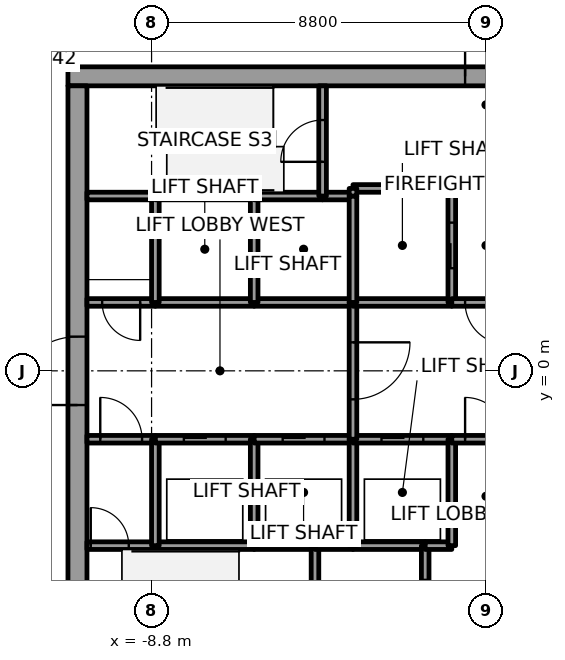
"""IFC4 building model, lengths in metres.
Left out: names, types, materials, properties, quantities, classifications, styles, units other than length and angle.
Written with IfcOpenShell. Run it as: python <this file> out.ifc"""

import sys

from ifc_helpers import new_model, si_unit, direction, frame, frame_2d, origin, place, context, subcontext, project, spatial, rectangle, extrude, element, fill, save


model = new_model("IFC4")
c1 = context("Model", 3, precision=1e-05, world=origin(), true_north=direction((0.0, 1.0)))
c2 = subcontext(c1, "Body", "Model", "MODEL_VIEW")
j1 = project(units=[si_unit("LENGTHUNIT", "METRE"), si_unit("PLANEANGLEUNIT", "RADIAN")], contexts=[c1])
p1 = place(None, origin())
s1 = spatial("IfcSite", under=j1, at=p1, CompositionType="ELEMENT")
p2 = place(p1, origin())
s2 = spatial("IfcBuilding", under=s1, at=p2, CompositionType="ELEMENT")
p3 = place(p2, frame((0.0, 0.0, 103.5)))
s3 = spatial("IfcBuildingStorey", under=s2, at=p3, CompositionType="ELEMENT", Elevation=103.5)
p4 = place(p3, frame((-11.0, 7.75, 0.0), z_axis=(0.0, 0.0, 1.0), x_axis=(1.0, 0.0, 0.0)))
e1 = element("IfcWall", 1, at=p4, inside=s3, PredefinedType="SHEAR", context=c2, shape_type="SweptSolid", body=[
    extrude(rectangle(XDim=22.0, YDim=0.5, at=frame_2d((11.0, 0.0))), origin(), (0.0, 0.0, 1.0), 3.7),
])
p5 = place(p4, frame((10.45, 0.0, 0.0)))
e2 = element("IfcOpeningElement", 2, at=p5, cuts=e1, PredefinedType="OPENING", context=c2, shape_type="SweptSolid", body=[
    extrude(rectangle(XDim=1.1, YDim=2.1, at=frame_2d((0.55, 1.05))), frame((0.0, 0.25, 0.0), z_axis=(0.0, -1.0, 0.0), x_axis=(1.0, 0.0, 0.0)), (0.0, 0.0, 1.0), 0.5),
])
p6 = place(p3, frame((-10.75, -7.5, 0.0), z_axis=(0.0, 0.0, 1.0), x_axis=(0.0, 1.0, 0.0)))
e3 = element("IfcWall", 3, at=p6, inside=s3, PredefinedType="SHEAR", context=c2, shape_type="SweptSolid", body=[
    extrude(rectangle(XDim=15.0, YDim=0.5, at=frame_2d((7.5, 0.0))), origin(), (0.0, 0.0, 1.0), 3.7),
])
p7 = place(p6, frame((6.6, 0.0, 0.0)))
e4 = element("IfcOpeningElement", 4, at=p7, cuts=e3, PredefinedType="OPENING", context=c2, shape_type="SweptSolid", body=[
    extrude(rectangle(XDim=1.8, YDim=2.1, at=frame_2d((0.9, 1.05))), frame((0.0, 0.25, 0.0), z_axis=(0.0, -1.0, 0.0), x_axis=(1.0, 0.0, 0.0)), (0.0, 0.0, 1.0), 0.5),
])
p8 = place(p3, frame((-10.5, -4.6, 0.0), z_axis=(0.0, 0.0, 1.0), x_axis=(1.0, 0.0, 0.0)))
e5 = element("IfcWall", 5, at=p8, inside=s3, PredefinedType="SOLIDWALL", context=c2, shape_type="SweptSolid", body=[
    extrude(rectangle(XDim=1.8, YDim=0.2, at=frame_2d((0.9, 0.0))), origin(), (0.0, 0.0, 1.0), 3.55),
])
p9 = place(p8, frame((0.1, 0.0, 0.0)))
e6 = element("IfcOpeningElement", 6, at=p9, cuts=e5, PredefinedType="OPENING", context=c2, shape_type="SweptSolid", body=[
    extrude(rectangle(XDim=1.0, YDim=2.1, at=frame_2d((0.5, 1.05))), frame((0.0, 0.1, 0.0), z_axis=(0.0, -1.0, 0.0), x_axis=(1.0, 0.0, 0.0)), (0.0, 0.0, 1.0), 0.2),
])
p10 = place(p3, frame((-10.5, -1.8, 0.0), z_axis=(0.0, 0.0, 1.0), x_axis=(1.0, 0.0, 0.0)))
e7 = element("IfcWall", 7, at=p10, inside=s3, PredefinedType="SOLIDWALL", context=c2, shape_type="SweptSolid", body=[
    extrude(rectangle(XDim=1.8, YDim=0.2, at=frame_2d((0.9, 0.0))), origin(), (0.0, 0.0, 1.0), 3.55),
])
p11 = place(p10, frame((0.35, 0.0, 0.0)))
e8 = element("IfcOpeningElement", 8, at=p11, cuts=e7, PredefinedType="OPENING", context=c2, shape_type="SweptSolid", body=[
    extrude(rectangle(XDim=1.1, YDim=2.1, at=frame_2d((0.55, 1.05))), frame((0.0, 0.1, 0.0), z_axis=(0.0, -1.0, 0.0), x_axis=(1.0, 0.0, 0.0)), (0.0, 0.0, 1.0), 0.2),
])
p12 = place(p3, frame((-8.7, 1.8, 0.0), z_axis=(0.0, 0.0, 1.0), x_axis=(-1.0, 0.0, 0.0)))
e9 = element("IfcWall", 9, at=p12, inside=s3, PredefinedType="SOLIDWALL", context=c2, shape_type="SweptSolid", body=[
    extrude(rectangle(XDim=1.8, YDim=0.2, at=frame_2d((0.9, 0.0))), origin(), (0.0, 0.0, 1.0), 3.55),
])
p13 = place(p12, frame((0.4, 0.0, 0.0)))
e10 = element("IfcOpeningElement", 10, at=p13, cuts=e9, PredefinedType="OPENING", context=c2, shape_type="SweptSolid", body=[
    extrude(rectangle(XDim=1.0, YDim=2.1, at=frame_2d((0.5, 1.05))), frame((0.0, 0.1, 0.0), z_axis=(0.0, -1.0, 0.0), x_axis=(1.0, 0.0, 0.0)), (0.0, 0.0, 1.0), 0.2),
])
p14 = place(p3, frame((-8.7, 4.6, 0.0), z_axis=(0.0, 0.0, 1.0), x_axis=(-1.0, 0.0, 0.0)))
e11 = element("IfcWall", 11, at=p14, inside=s3, PredefinedType="SOLIDWALL", context=c2, shape_type="SweptSolid", body=[
    extrude(rectangle(XDim=1.8, YDim=0.2, at=frame_2d((0.9, 0.0))), origin(), (0.0, 0.0, 1.0), 3.55),
])
p15 = place(p3, frame((-8.7, -4.6, 0.0), z_axis=(0.0, 0.0, 1.0), x_axis=(1.0, 0.0, 0.0)))
e12 = element("IfcWall", 12, at=p15, inside=s3, PredefinedType="SOLIDWALL", context=c2, shape_type="SweptSolid", body=[
    extrude(rectangle(XDim=2.6, YDim=0.2, at=frame_2d((1.3, 0.0))), origin(), (0.0, 0.0, 1.0), 3.55),
])
p16 = place(p3, frame((-8.7, -4.6, 0.0), z_axis=(0.0, 0.0, 1.0), x_axis=(0.0, 1.0, 0.0)))
e13 = element("IfcWall", 13, at=p16, inside=s3, PredefinedType="SOLIDWALL", context=c2, shape_type="SweptSolid", body=[
    extrude(rectangle(XDim=2.8, YDim=0.2, at=frame_2d((1.4, 0.0))), origin(), (0.0, 0.0, 1.0), 3.55),
])
p17 = place(p3, frame((-8.7, -1.8, 0.0), z_axis=(0.0, 0.0, 1.0), x_axis=(1.0, 0.0, 0.0)))
e14 = element("IfcWall", 14, at=p17, inside=s3, PredefinedType="SOLIDWALL", context=c2, shape_type="SweptSolid", body=[
    extrude(rectangle(XDim=2.6, YDim=0.2, at=frame_2d((1.3, 0.0))), origin(), (0.0, 0.0, 1.0), 3.55),
])
p18 = place(p17, frame((0.75, 0.0, 0.0)))
e15 = element("IfcOpeningElement", 15, at=p18, cuts=e14, PredefinedType="OPENING", context=c2, shape_type="SweptSolid", body=[
    extrude(rectangle(XDim=1.1, YDim=2.1, at=frame_2d((0.55, 1.05))), frame((0.0, 0.1, 0.0), z_axis=(0.0, -1.0, 0.0), x_axis=(1.0, 0.0, 0.0)), (0.0, 0.0, 1.0), 0.2),
])
p19 = place(p3, frame((-6.1, 1.8, 0.0), z_axis=(0.0, 0.0, 1.0), x_axis=(-1.0, 0.0, 0.0)))
e16 = element("IfcWall", 16, at=p19, inside=s3, PredefinedType="SOLIDWALL", context=c2, shape_type="SweptSolid", body=[
    extrude(rectangle(XDim=2.6, YDim=0.2, at=frame_2d((1.3, 0.0))), origin(), (0.0, 0.0, 1.0), 3.55),
])
p20 = place(p3, frame((-8.7, 1.8, 0.0), z_axis=(0.0, 0.0, 1.0), x_axis=(0.0, 1.0, 0.0)))
e17 = element("IfcWall", 17, at=p20, inside=s3, PredefinedType="SOLIDWALL", context=c2, shape_type="SweptSolid", body=[
    extrude(rectangle(XDim=2.8, YDim=0.2, at=frame_2d((1.4, 0.0))), origin(), (0.0, 0.0, 1.0), 3.55),
])
p21 = place(p3, frame((-6.1, 4.6, 0.0), z_axis=(0.0, 0.0, 1.0), x_axis=(-1.0, 0.0, 0.0)))
e18 = element("IfcWall", 18, at=p21, inside=s3, PredefinedType="SOLIDWALL", context=c2, shape_type="SweptSolid", body=[
    extrude(rectangle(XDim=2.6, YDim=0.2, at=frame_2d((1.3, 0.0))), origin(), (0.0, 0.0, 1.0), 3.55),
])
p22 = place(p3, frame((-6.1, -4.6, 0.0), z_axis=(0.0, 0.0, 1.0), x_axis=(1.0, 0.0, 0.0)))
e19 = element("IfcWall", 19, at=p22, inside=s3, PredefinedType="SOLIDWALL", context=c2, shape_type="SweptSolid", body=[
    extrude(rectangle(XDim=1.6, YDim=0.2, at=frame_2d((0.8, 0.0))), origin(), (0.0, 0.0, 1.0), 3.55),
])
p23 = place(p3, frame((-6.1, -4.6, 0.0), z_axis=(0.0, 0.0, 1.0), x_axis=(0.0, 1.0, 0.0)))
e20 = element("IfcWall", 20, at=p23, inside=s3, PredefinedType="SOLIDWALL", context=c2, shape_type="SweptSolid", body=[
    extrude(rectangle(XDim=2.8, YDim=0.2, at=frame_2d((1.4, 0.0))), origin(), (0.0, 0.0, 1.0), 3.55),
])
p24 = place(p3, frame((-6.1, -1.8, 0.0), z_axis=(0.0, 0.0, 1.0), x_axis=(1.0, 0.0, 0.0)))
e21 = element("IfcWall", 21, at=p24, inside=s3, PredefinedType="SOLIDWALL", context=c2, shape_type="SweptSolid", body=[
    extrude(rectangle(XDim=2.6, YDim=0.2, at=frame_2d((1.3, 0.0))), origin(), (0.0, 0.0, 1.0), 3.55),
])
p25 = place(p24, frame((0.75, 0.0, 0.0)))
e22 = element("IfcOpeningElement", 22, at=p25, cuts=e21, PredefinedType="OPENING", context=c2, shape_type="SweptSolid", body=[
    extrude(rectangle(XDim=1.1, YDim=2.1, at=frame_2d((0.55, 1.05))), frame((0.0, 0.1, 0.0), z_axis=(0.0, -1.0, 0.0), x_axis=(1.0, 0.0, 0.0)), (0.0, 0.0, 1.0), 0.2),
])
p26 = place(p3, frame((-3.5, 1.8, 0.0), z_axis=(0.0, 0.0, 1.0), x_axis=(-1.0, 0.0, 0.0)))
e23 = element("IfcWall", 23, at=p26, inside=s3, PredefinedType="SOLIDWALL", context=c2, shape_type="SweptSolid", body=[
    extrude(rectangle(XDim=2.6, YDim=0.2, at=frame_2d((1.3, 0.0))), origin(), (0.0, 0.0, 1.0), 3.55),
])
p27 = place(p3, frame((-6.1, 1.8, 0.0), z_axis=(0.0, 0.0, 1.0), x_axis=(0.0, 1.0, 0.0)))
e24 = element("IfcWall", 24, at=p27, inside=s3, PredefinedType="SOLIDWALL", context=c2, shape_type="SweptSolid", body=[
    extrude(rectangle(XDim=2.8, YDim=0.2, at=frame_2d((1.4, 0.0))), origin(), (0.0, 0.0, 1.0), 3.55),
])
p28 = place(p3, frame((-4.3, 4.6, 0.0), z_axis=(0.0, 0.0, 1.0), x_axis=(-1.0, 0.0, 0.0)))
e25 = element("IfcWall", 25, at=p28, inside=s3, PredefinedType="SOLIDWALL", context=c2, shape_type="SweptSolid", body=[
    extrude(rectangle(XDim=1.8, YDim=0.2, at=frame_2d((0.9, 0.0))), origin(), (0.0, 0.0, 1.0), 3.55),
])
p29 = place(p3, frame((-4.5, -4.6, 0.0), z_axis=(0.0, 0.0, 1.0), x_axis=(0.0, -1.0, 0.0)))
e26 = element("IfcWall", 26, at=p29, inside=s3, PredefinedType="SOLIDWALL", context=c2, shape_type="SweptSolid", body=[
    extrude(rectangle(XDim=2.9, YDim=0.2, at=frame_2d((1.45, 0.0))), origin(), (0.0, 0.0, 1.0), 3.55),
])
p30 = place(p3, frame((-4.5, -4.6, 0.0), z_axis=(0.0, 0.0, 1.0), x_axis=(1.0, 0.0, 0.0)))
e27 = element("IfcWall", 27, at=p30, inside=s3, PredefinedType="SOLIDWALL", context=c2, shape_type="SweptSolid", body=[
    extrude(rectangle(XDim=1.0, YDim=0.2, at=frame_2d((0.5, 0.0))), origin(), (0.0, 0.0, 1.0), 3.55),
])
p31 = place(p3, frame((-3.5, 4.6, 0.0), z_axis=(0.0, 0.0, 1.0), x_axis=(-1.0, 0.0, 0.0)))
e28 = element("IfcWall", 28, at=p31, inside=s3, PredefinedType="SOLIDWALL", context=c2, shape_type="SweptSolid", body=[
    extrude(rectangle(XDim=0.8, YDim=0.2, at=frame_2d((0.4, 0.0))), origin(), (0.0, 0.0, 1.0), 3.55),
])
p32 = place(p3, frame((-4.3, 4.6, 0.0), z_axis=(0.0, 0.0, 1.0), x_axis=(0.0, 1.0, 0.0)))
e29 = element("IfcWall", 29, at=p32, inside=s3, PredefinedType="SOLIDWALL", context=c2, shape_type="SweptSolid", body=[
    extrude(rectangle(XDim=2.9, YDim=0.2, at=frame_2d((1.45, 0.0))), origin(), (0.0, 0.0, 1.0), 3.55),
])
p33 = place(p32, frame((0.9, 0.0, 0.0)))
e30 = element("IfcOpeningElement", 30, at=p33, cuts=e29, PredefinedType="OPENING", context=c2, shape_type="SweptSolid", body=[
    extrude(rectangle(XDim=1.1, YDim=2.1, at=frame_2d((0.55, 1.05))), frame((0.0, 0.1, 0.0), z_axis=(0.0, -1.0, 0.0), x_axis=(1.0, 0.0, 0.0)), (0.0, 0.0, 1.0), 0.2),
])
p34 = place(p3, frame((-3.5, -4.6, 0.0), z_axis=(0.0, 0.0, 1.0), x_axis=(1.0, 0.0, 0.0)))
e31 = element("IfcWall", 31, at=p34, inside=s3, PredefinedType="SOLIDWALL", context=c2, shape_type="SweptSolid", body=[
    extrude(rectangle(XDim=1.9, YDim=0.2, at=frame_2d((0.95, 0.0))), origin(), (0.0, 0.0, 1.0), 3.55),
])
p35 = place(p3, frame((-3.5, -4.6, 0.0), z_axis=(0.0, 0.0, 1.0), x_axis=(0.0, 1.0, 0.0)))
e32 = element("IfcWall", 32, at=p35, inside=s3, PredefinedType="SOLIDWALL", context=c2, shape_type="SweptSolid", body=[
    extrude(rectangle(XDim=2.8, YDim=0.2, at=frame_2d((1.4, 0.0))), origin(), (0.0, 0.0, 1.0), 3.55),
])
p36 = place(p3, frame((-3.5, -1.8, 0.0), z_axis=(0.0, 0.0, 1.0), x_axis=(1.0, 0.0, 0.0)))
e33 = element("IfcWall", 33, at=p36, inside=s3, PredefinedType="SOLIDWALL", context=c2, shape_type="SweptSolid", body=[
    extrude(rectangle(XDim=2.6, YDim=0.2, at=frame_2d((1.3, 0.0))), origin(), (0.0, 0.0, 1.0), 3.55),
])
p37 = place(p36, frame((0.75, 0.0, 0.0)))
e34 = element("IfcOpeningElement", 34, at=p37, cuts=e33, PredefinedType="OPENING", context=c2, shape_type="SweptSolid", body=[
    extrude(rectangle(XDim=1.1, YDim=2.1, at=frame_2d((0.55, 1.05))), frame((0.0, 0.1, 0.0), z_axis=(0.0, -1.0, 0.0), x_axis=(1.0, 0.0, 0.0)), (0.0, 0.0, 1.0), 0.2),
])
p38 = place(p3, frame((-3.5, 1.8, 0.0), z_axis=(0.0, 0.0, 1.0), x_axis=(0.0, -1.0, 0.0)))
e35 = element("IfcWall", 35, at=p38, inside=s3, PredefinedType="SOLIDWALL", context=c2, shape_type="SweptSolid", body=[
    extrude(rectangle(XDim=3.6, YDim=0.2, at=frame_2d((1.8, 0.0))), origin(), (0.0, 0.0, 1.0), 3.55),
])
p39 = place(p38, frame((1.05, 0.0, 0.0)))
e36 = element("IfcOpeningElement", 36, at=p39, cuts=e35, PredefinedType="OPENING", context=c2, shape_type="SweptSolid", body=[
    extrude(rectangle(XDim=1.5, YDim=2.1, at=frame_2d((0.75, 1.05))), frame((0.0, 0.1, 0.0), z_axis=(0.0, -1.0, 0.0), x_axis=(1.0, 0.0, 0.0)), (0.0, 0.0, 1.0), 0.2),
])
p40 = place(p3, frame((-0.9, 1.8, 0.0), z_axis=(0.0, 0.0, 1.0), x_axis=(-1.0, 0.0, 0.0)))
e37 = element("IfcWall", 37, at=p40, inside=s3, PredefinedType="SOLIDWALL", context=c2, shape_type="SweptSolid", body=[
    extrude(rectangle(XDim=2.6, YDim=0.2, at=frame_2d((1.3, 0.0))), origin(), (0.0, 0.0, 1.0), 3.55),
])
p41 = place(p3, frame((-3.5, 4.6, 0.0), z_axis=(0.0, 0.0, 1.0), x_axis=(0.0, -1.0, 0.0)))
e38 = element("IfcWall", 38, at=p41, inside=s3, PredefinedType="SOLIDWALL", context=c2, shape_type="SweptSolid", body=[
    extrude(rectangle(XDim=2.8, YDim=0.2, at=frame_2d((1.4, 0.0))), origin(), (0.0, 0.0, 1.0), 3.55),
])
p42 = place(p3, frame((-0.9, 1.8, 0.0), z_axis=(0.0, 0.0, 1.0), x_axis=(0.0, 1.0, 0.0)))
e39 = element("IfcWall", 39, at=p42, inside=s3, PredefinedType="SOLIDWALL", context=c2, shape_type="SweptSolid", body=[
    extrude(rectangle(XDim=3.0, YDim=0.2, at=frame_2d((1.5, 0.0))), origin(), (0.0, 0.0, 1.0), 3.55),
])
p43 = place(p42, frame((0.9, 0.0, 0.0)))
e40 = element("IfcOpeningElement", 40, at=p43, cuts=e39, PredefinedType="OPENING", context=c2, shape_type="SweptSolid", body=[
    extrude(rectangle(XDim=1.2, YDim=2.1, at=frame_2d((0.6, 1.05))), frame((0.0, 0.1, 0.0), z_axis=(0.0, -1.0, 0.0), x_axis=(1.0, 0.0, 0.0)), (0.0, 0.0, 1.0), 0.2),
])
p44 = place(p3, frame((-0.9, 4.8, 0.0), z_axis=(0.0, 0.0, 1.0), x_axis=(-1.0, 0.0, 0.0)))
e41 = element("IfcWall", 41, at=p44, inside=s3, PredefinedType="SOLIDWALL", context=c2, shape_type="SweptSolid", body=[
    extrude(rectangle(XDim=2.6, YDim=0.2, at=frame_2d((1.3, 0.0))), origin(), (0.0, 0.0, 1.0), 3.55),
])
p45 = place(p3, frame((-3.5, 4.8, 0.0), z_axis=(0.0, 0.0, 1.0), x_axis=(0.0, -1.0, 0.0)))
e42 = element("IfcWall", 42, at=p45, inside=s3, PredefinedType="SOLIDWALL", context=c2, shape_type="SweptSolid", body=[
    extrude(rectangle(XDim=0.2, YDim=0.2, at=frame_2d((0.1, 0.0))), origin(), (0.0, 0.0, 1.0), 3.55),
])
p46 = place(p3, frame((-1.6, -7.5, 0.0), z_axis=(0.0, 0.0, 1.0), x_axis=(0.0, 1.0, 0.0)))
e43 = element("IfcWall", 43, at=p46, inside=s3, PredefinedType="SOLIDWALL", context=c2, shape_type="SweptSolid", body=[
    extrude(rectangle(XDim=2.9, YDim=0.2, at=frame_2d((1.45, 0.0))), origin(), (0.0, 0.0, 1.0), 3.55),
])
p47 = place(p46, frame((0.9, 0.0, 0.0)))
e44 = element("IfcOpeningElement", 44, at=p47, cuts=e43, PredefinedType="OPENING", context=c2, shape_type="SweptSolid", body=[
    extrude(rectangle(XDim=1.1, YDim=2.1, at=frame_2d((0.55, 1.05))), frame((0.0, 0.1, 0.0), z_axis=(0.0, -1.0, 0.0), x_axis=(1.0, 0.0, 0.0)), (0.0, 0.0, 1.0), 0.2),
])
p48 = place(p3, frame((-1.6, -4.6, 0.0), z_axis=(0.0, 0.0, 1.0), x_axis=(1.0, 0.0, 0.0)))
e45 = element("IfcWall", 45, at=p48, inside=s3, PredefinedType="SOLIDWALL", context=c2, shape_type="SweptSolid", body=[
    extrude(rectangle(XDim=0.7, YDim=0.2, at=frame_2d((0.35, 0.0))), origin(), (0.0, 0.0, 1.0), 3.55),
])
p49 = place(p3, frame((-0.9, -4.6, 0.0), z_axis=(0.0, 0.0, 1.0), x_axis=(0.0, 1.0, 0.0)))
e46 = element("IfcWall", 46, at=p49, inside=s3, PredefinedType="SOLIDWALL", context=c2, shape_type="SweptSolid", body=[
    extrude(rectangle(XDim=2.8, YDim=0.2, at=frame_2d((1.4, 0.0))), origin(), (0.0, 0.0, 1.0), 3.55),
])
p50 = place(p3, frame((-0.9, -1.8, 0.0), z_axis=(0.0, 0.0, 1.0), x_axis=(1.0, 0.0, 0.0)))
e47 = element("IfcWall", 47, at=p50, inside=s3, PredefinedType="SOLIDWALL", context=c2, shape_type="SweptSolid", body=[
    extrude(rectangle(XDim=1.8, YDim=0.2, at=frame_2d((0.9, 0.0))), origin(), (0.0, 0.0, 1.0), 3.55),
])
p51 = place(p50, frame((0.35, 0.0, 0.0)))
e48 = element("IfcOpeningElement", 48, at=p51, cuts=e47, PredefinedType="OPENING", context=c2, shape_type="SweptSolid", body=[
    extrude(rectangle(XDim=1.1, YDim=2.1, at=frame_2d((0.55, 1.05))), frame((0.0, 0.1, 0.0), z_axis=(0.0, -1.0, 0.0), x_axis=(1.0, 0.0, 0.0)), (0.0, 0.0, 1.0), 0.2),
])
p52 = place(p3, frame((0.9, 1.8, 0.0), z_axis=(0.0, 0.0, 1.0), x_axis=(-1.0, 0.0, 0.0)))
e49 = element("IfcWall", 49, at=p52, inside=s3, PredefinedType="SOLIDWALL", context=c2, shape_type="SweptSolid", body=[
    extrude(rectangle(XDim=1.8, YDim=0.2, at=frame_2d((0.9, 0.0))), origin(), (0.0, 0.0, 1.0), 3.55),
])
p53 = place(p52, frame((0.35, 0.0, 0.0)))
e50 = element("IfcOpeningElement", 50, at=p53, cuts=e49, PredefinedType="OPENING", context=c2, shape_type="SweptSolid", body=[
    extrude(rectangle(XDim=1.1, YDim=2.1, at=frame_2d((0.55, 1.05))), frame((0.0, 0.1, 0.0), z_axis=(0.0, -1.0, 0.0), x_axis=(1.0, 0.0, 0.0)), (0.0, 0.0, 1.0), 0.2),
])
p54 = place(p18, origin())
e51 = element("IfcDoor", 51, at=p54, inside=s3, OperationType="SLIDING_TO_RIGHT", PredefinedType="DOOR", context=c2, shape_type="SweptSolid", body=[
    extrude(rectangle(XDim=1.1, YDim=2.1, at=frame_2d((0.55, 1.05))), frame((0.0, 0.025, 0.0), z_axis=(0.0, -1.0, 0.0), x_axis=(1.0, 0.0, 0.0)), (0.0, 0.0, 1.0), 0.05),
])
fill(e15, e51)
p55 = place(p25, origin())
e52 = element("IfcDoor", 52, at=p55, inside=s3, OperationType="SLIDING_TO_RIGHT", PredefinedType="DOOR", context=c2, shape_type="SweptSolid", body=[
    extrude(rectangle(XDim=1.1, YDim=2.1, at=frame_2d((0.55, 1.05))), frame((0.0, 0.025, 0.0), z_axis=(0.0, -1.0, 0.0), x_axis=(1.0, 0.0, 0.0)), (0.0, 0.0, 1.0), 0.05),
])
fill(e22, e52)
p56 = place(p37, origin())
e53 = element("IfcDoor", 53, at=p56, inside=s3, OperationType="SLIDING_TO_RIGHT", PredefinedType="DOOR", context=c2, shape_type="SweptSolid", body=[
    extrude(rectangle(XDim=1.1, YDim=2.1, at=frame_2d((0.55, 1.05))), frame((0.0, 0.025, 0.0), z_axis=(0.0, -1.0, 0.0), x_axis=(1.0, 0.0, 0.0)), (0.0, 0.0, 1.0), 0.05),
])
fill(e34, e53)
p57 = place(p43, origin())
e54 = element("IfcDoor", 54, at=p57, inside=s3, OperationType="SLIDING_TO_RIGHT", PredefinedType="DOOR", context=c2, shape_type="SweptSolid", body=[
    extrude(rectangle(XDim=1.2, YDim=2.1, at=frame_2d((0.6, 1.05))), frame((0.0, 0.025, 0.0), z_axis=(0.0, -1.0, 0.0), x_axis=(1.0, 0.0, 0.0)), (0.0, 0.0, 1.0), 0.05),
])
fill(e40, e54)
p58 = place(p39, origin())
e55 = element("IfcDoor", 55, at=p58, inside=s3, OperationType="DOUBLE_DOOR_SINGLE_SWING", PredefinedType="DOOR", context=c2, shape_type="SweptSolid", body=[
    extrude(rectangle(XDim=1.5, YDim=2.1, at=frame_2d((0.75, 1.05))), frame((0.0, 0.025, 0.0), z_axis=(0.0, -1.0, 0.0), x_axis=(1.0, 0.0, 0.0)), (0.0, 0.0, 1.0), 0.05),
])
fill(e36, e55)
p59 = place(p11, origin())
e56 = element("IfcDoor", 56, at=p59, inside=s3, OperationType="SINGLE_SWING_RIGHT", PredefinedType="DOOR", context=c2, shape_type="SweptSolid", body=[
    extrude(rectangle(XDim=1.1, YDim=2.1, at=frame_2d((0.55, 1.05))), frame((0.0, 0.025, 0.0), z_axis=(0.0, -1.0, 0.0), x_axis=(1.0, 0.0, 0.0)), (0.0, 0.0, 1.0), 0.05),
])
fill(e8, e56)
p60 = place(p53, origin())
e57 = element("IfcDoor", 57, at=p60, inside=s3, OperationType="SINGLE_SWING_LEFT", PredefinedType="DOOR", context=c2, shape_type="SweptSolid", body=[
    extrude(rectangle(XDim=1.1, YDim=2.1, at=frame_2d((0.55, 1.05))), frame((0.0, 0.025, 0.0), z_axis=(0.0, -1.0, 0.0), x_axis=(1.0, 0.0, 0.0)), (0.0, 0.0, 1.0), 0.05),
])
fill(e50, e57)
p61 = place(p51, origin())
e58 = element("IfcDoor", 58, at=p61, inside=s3, OperationType="SINGLE_SWING_RIGHT", PredefinedType="DOOR", context=c2, shape_type="SweptSolid", body=[
    extrude(rectangle(XDim=1.1, YDim=2.1, at=frame_2d((0.55, 1.05))), frame((0.0, 0.025, 0.0), z_axis=(0.0, -1.0, 0.0), x_axis=(1.0, 0.0, 0.0)), (0.0, 0.0, 1.0), 0.05),
])
fill(e48, e58)
p62 = place(p13, origin())
e59 = element("IfcDoor", 59, at=p62, inside=s3, OperationType="SINGLE_SWING_LEFT", PredefinedType="DOOR", context=c2, shape_type="SweptSolid", body=[
    extrude(rectangle(XDim=1.0, YDim=2.1, at=frame_2d((0.5, 1.05))), frame((0.0, 0.025, 0.0), z_axis=(0.0, -1.0, 0.0), x_axis=(1.0, 0.0, 0.0)), (0.0, 0.0, 1.0), 0.05),
])
fill(e10, e59)
p63 = place(p9, origin())
e60 = element("IfcDoor", 60, at=p63, inside=s3, OperationType="SINGLE_SWING_LEFT", PredefinedType="DOOR", context=c2, shape_type="SweptSolid", body=[
    extrude(rectangle(XDim=1.0, YDim=2.1, at=frame_2d((0.5, 1.05))), frame((0.0, 0.025, 0.0), z_axis=(0.0, -1.0, 0.0), x_axis=(1.0, 0.0, 0.0)), (0.0, 0.0, 1.0), 0.05),
])
fill(e6, e60)
p64 = place(p33, origin())
e61 = element("IfcDoor", 61, at=p64, inside=s3, OperationType="SINGLE_SWING_RIGHT", PredefinedType="DOOR", context=c2, shape_type="SweptSolid", body=[
    extrude(rectangle(XDim=1.1, YDim=2.1, at=frame_2d((0.55, 1.05))), frame((0.0, 0.025, 0.0), z_axis=(0.0, -1.0, 0.0), x_axis=(1.0, 0.0, 0.0)), (0.0, 0.0, 1.0), 0.05),
])
fill(e30, e61)
p65 = place(p7, origin())
e62 = element("IfcDoor", 62, at=p65, inside=s3, OperationType="DOUBLE_DOOR_SINGLE_SWING", PredefinedType="DOOR", context=c2, shape_type="SweptSolid", body=[
    extrude(rectangle(XDim=1.8, YDim=2.1, at=frame_2d((0.9, 1.05))), frame((0.0, 0.025, 0.0), z_axis=(0.0, -1.0, 0.0), x_axis=(1.0, 0.0, 0.0)), (0.0, 0.0, 1.0), 0.05),
])
fill(e4, e62)
p66 = place(p5, origin())
e63 = element("IfcDoor", 63, at=p66, inside=s3, OperationType="SINGLE_SWING_RIGHT", PredefinedType="DOOR", context=c2, shape_type="SweptSolid", body=[
    extrude(rectangle(XDim=1.1, YDim=2.1, at=frame_2d((0.55, 1.05))), frame((0.0, 0.025, 0.0), z_axis=(0.0, -1.0, 0.0), x_axis=(1.0, 0.0, 0.0)), (0.0, 0.0, 1.0), 0.05),
])
fill(e2, e63)
save(model, sys.argv[1])
